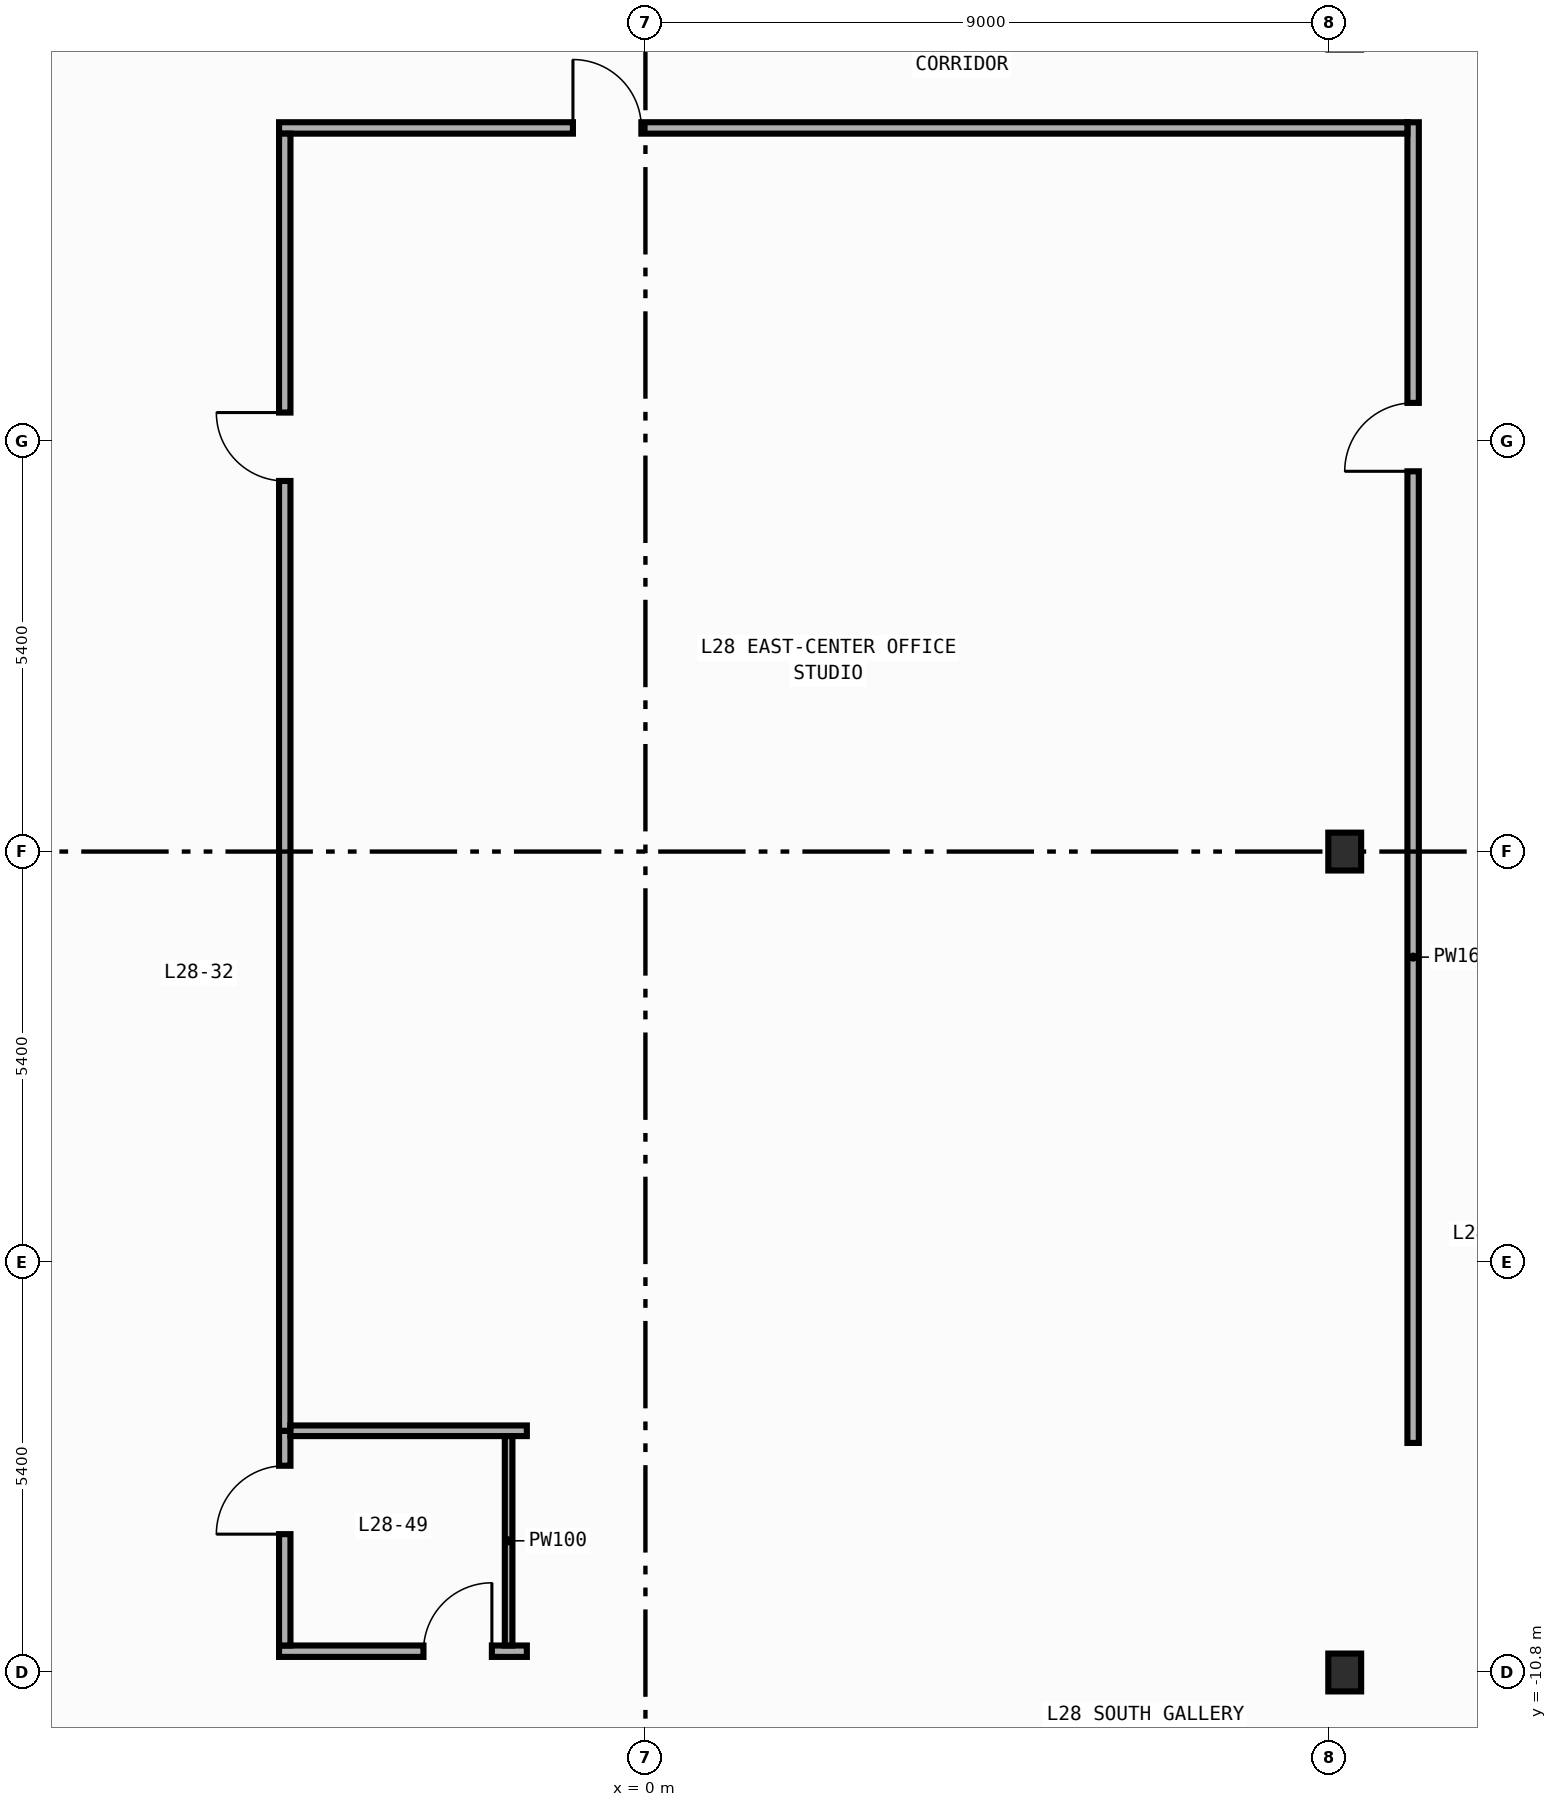
"""IFC4 building model, lengths in metres.
Left out: names, types, materials, properties, quantities, classifications, styles, units other than length and angle.
Written with IfcOpenShell. Run it as: python <this file> out.ifc"""

import sys

from ifc_helpers import new_model, si_unit, direction, frame, frame_2d, origin, origin_2d, place, context, subcontext, project, spatial, rectangle, i_section, extrude, element, fill, save


model = new_model("IFC4")
c1 = context("Model", 3, precision=1e-05, world=origin(), true_north=direction((0.0, 1.0)))
c2 = subcontext(c1, "Body", "Model", "MODEL_VIEW")
j1 = project(units=[si_unit("LENGTHUNIT", "METRE"), si_unit("PLANEANGLEUNIT", "RADIAN")], contexts=[c1])
p1 = place(None, origin())
s1 = spatial("IfcSite", under=j1, at=p1, CompositionType="ELEMENT")
p2 = place(p1, origin())
s2 = spatial("IfcBuilding", under=s1, at=p2, CompositionType="ELEMENT")
p3 = place(p2, frame((0.0, 0.0, 122.6)))
s3 = spatial("IfcBuildingStorey", under=s2, at=p3, CompositionType="ELEMENT", Elevation=122.6)
for number, where, z_axis, x_axis in (
    (1, (9.2, -10.8, 0.0), (0.0, 0.0, 1.0), (1.0, 0.0, 0.0)),
    (2, (9.2, 0.0, 0.0), (0.0, 0.0, 1.0), (1.0, 0.0, 0.0)),
):
    element("IfcColumn", number, at=place(p3, frame(where, z_axis=z_axis, x_axis=x_axis)), inside=s3, PredefinedType="COLUMN", context=c2, shape_type="SweptSolid", body=[
        extrude(i_section(OverallWidth=0.432, OverallDepth=0.498, WebThickness=0.045, FlangeThickness=0.07, FilletRadius=0.022, at=origin_2d()), origin(), (0.0, 0.0, 1.0), 4.2),
    ])
p4 = place(p3, frame((10.1, -7.78, 0.0), z_axis=(0.0, 0.0, 1.0), x_axis=(0.0, 1.0, 0.0)))
e3 = element("IfcWall", 3, at=p4, inside=s3, PredefinedType="PARTITIONING", context=c2, shape_type="SweptSolid", body=[
    extrude(rectangle(XDim=17.375, YDim=0.15, at=frame_2d((8.688, 0.0))), origin(), (0.0, 0.0, 1.0), 3.94),
])
p5 = place(p4, frame((12.783, 0.0, 0.0)))
e4 = element("IfcOpeningElement", 4, at=p5, cuts=e3, PredefinedType="OPENING", context=c2, shape_type="SweptSolid", body=[
    extrude(rectangle(XDim=0.9, YDim=2.15, at=frame_2d((0.45, 1.075))), frame((0.0, 0.085, 0.0), z_axis=(0.0, -1.0, 0.0), x_axis=(1.0, 0.0, 0.0)), (0.0, 0.0, 1.0), 0.17),
])
p6 = place(p3, frame((-4.82, 9.52, 0.0), z_axis=(0.0, 0.0, 1.0), x_axis=(1.0, 0.0, 0.0)))
e5 = element("IfcWall", 5, at=p6, inside=s3, PredefinedType="PARTITIONING", context=c2, shape_type="SweptSolid", body=[
    extrude(rectangle(XDim=14.845, YDim=0.15, at=frame_2d((7.422, 0.0))), origin(), (0.0, 0.0, 1.0), 3.94),
])
p7 = place(p6, frame((3.866, 0.0, 0.0)))
e6 = element("IfcOpeningElement", 6, at=p7, cuts=e5, PredefinedType="OPENING", context=c2, shape_type="SweptSolid", body=[
    extrude(rectangle(XDim=0.9, YDim=2.15, at=frame_2d((0.45, 1.075))), frame((0.0, 0.085, 0.0), z_axis=(0.0, -1.0, 0.0), x_axis=(1.0, 0.0, 0.0)), (0.0, 0.0, 1.0), 0.17),
])
p8 = place(p3, frame((-4.82, -10.52, 0.0), z_axis=(0.0, 0.0, 1.0), x_axis=(1.0, 0.0, 0.0)))
e7 = element("IfcWall", 7, at=p8, inside=s3, PredefinedType="PARTITIONING", context=c2, shape_type="SweptSolid", body=[
    extrude(rectangle(XDim=3.26, YDim=0.15, at=frame_2d((1.63, 0.0))), origin(), (0.0, 0.0, 1.0), 3.24),
])
p9 = place(p8, frame((1.9, 0.0, 0.0)))
e8 = element("IfcOpeningElement", 8, at=p9, cuts=e7, PredefinedType="OPENING", context=c2, shape_type="SweptSolid", body=[
    extrude(rectangle(XDim=0.9, YDim=2.15, at=frame_2d((0.45, 1.075))), frame((0.0, 0.085, 0.0), z_axis=(0.0, -1.0, 0.0), x_axis=(1.0, 0.0, 0.0)), (0.0, 0.0, 1.0), 0.17),
])
p10 = place(p3, frame((-4.745, -10.445, 0.0), z_axis=(0.0, 0.0, 1.0), x_axis=(0.0, 1.0, 0.0)))
e9 = element("IfcWall", 9, at=p10, inside=s3, PredefinedType="PARTITIONING", context=c2, shape_type="SweptSolid", body=[
    extrude(rectangle(XDim=2.825, YDim=0.15, at=frame_2d((1.413, 0.0))), origin(), (0.0, 0.0, 1.0), 3.49),
])
p11 = place(p10, frame((1.465, 0.0, 0.0)))
e10 = element("IfcOpeningElement", 10, at=p11, cuts=e9, PredefinedType="OPENING", context=c2, shape_type="SweptSolid", body=[
    extrude(rectangle(XDim=0.9, YDim=2.15, at=frame_2d((0.45, 1.075))), frame((0.0, 0.085, 0.0), z_axis=(0.0, -1.0, 0.0), x_axis=(1.0, 0.0, 0.0)), (0.0, 0.0, 1.0), 0.17),
])
p12 = place(p3, frame((-4.745, -7.62, 0.0), z_axis=(0.0, 0.0, 1.0), x_axis=(0.0, 1.0, 0.0)))
e11 = element("IfcWall", 11, at=p12, inside=s3, PredefinedType="PARTITIONING", context=c2, shape_type="SweptSolid", body=[
    extrude(rectangle(XDim=17.065, YDim=0.15, at=frame_2d((8.533, 0.0))), origin(), (0.0, 0.0, 1.0), 3.49),
])
p13 = place(p12, frame((12.496, 0.0, 0.0)))
e12 = element("IfcOpeningElement", 12, at=p13, cuts=e11, PredefinedType="OPENING", context=c2, shape_type="SweptSolid", body=[
    extrude(rectangle(XDim=0.9, YDim=2.15, at=frame_2d((0.45, 1.075))), frame((0.0, 0.085, 0.0), z_axis=(0.0, -1.0, 0.0), x_axis=(1.0, 0.0, 0.0)), (0.0, 0.0, 1.0), 0.17),
])
p14 = place(p3, frame((-4.67, -7.62, 0.0), z_axis=(0.0, 0.0, 1.0), x_axis=(1.0, 0.0, 0.0)))
e13 = element("IfcWall", 13, at=p14, inside=s3, PredefinedType="PARTITIONING", context=c2, shape_type="SweptSolid", body=[
    extrude(rectangle(XDim=3.11, YDim=0.14, at=frame_2d((1.555, 0.0))), origin(), (0.0, 0.0, 1.0), 3.94),
])
p15 = place(p3, frame((-1.8, -7.69, 0.0), z_axis=(0.0, 0.0, 1.0), x_axis=(0.0, -1.0, 0.0)))
e14 = element("IfcWall", 14, at=p15, inside=s3, PredefinedType="PARTITIONING", context=c2, shape_type="SweptSolid", body=[
    extrude(rectangle(XDim=2.755, YDim=0.1, at=frame_2d((1.377, 0.0))), origin(), (0.0, 0.0, 1.0), 3.94),
])
p16 = place(p5, origin())
e15 = element("IfcDoor", 15, at=p16, inside=s3, OperationType="SINGLE_SWING_LEFT", PredefinedType="DOOR", context=c2, shape_type="SweptSolid", body=[
    extrude(rectangle(XDim=0.9, YDim=2.15, at=frame_2d((0.45, 1.075))), frame((0.0, 0.025, 0.0), z_axis=(0.0, -1.0, 0.0), x_axis=(1.0, 0.0, 0.0)), (0.0, 0.0, 1.0), 0.05),
])
fill(e4, e15)
p17 = place(p7, origin())
e16 = element("IfcDoor", 16, at=p17, inside=s3, OperationType="SINGLE_SWING_LEFT", PredefinedType="DOOR", context=c2, shape_type="SweptSolid", body=[
    extrude(rectangle(XDim=0.9, YDim=2.15, at=frame_2d((0.45, 1.075))), frame((0.0, 0.025, 0.0), z_axis=(0.0, -1.0, 0.0), x_axis=(1.0, 0.0, 0.0)), (0.0, 0.0, 1.0), 0.05),
])
fill(e6, e16)
p18 = place(p9, origin())
e17 = element("IfcDoor", 17, at=p18, inside=s3, OperationType="SINGLE_SWING_RIGHT", PredefinedType="DOOR", context=c2, shape_type="SweptSolid", body=[
    extrude(rectangle(XDim=0.9, YDim=2.15, at=frame_2d((0.45, 1.075))), frame((0.0, 0.025, 0.0), z_axis=(0.0, -1.0, 0.0), x_axis=(1.0, 0.0, 0.0)), (0.0, 0.0, 1.0), 0.05),
])
fill(e8, e17)
p19 = place(p11, origin())
e18 = element("IfcDoor", 18, at=p19, inside=s3, OperationType="SINGLE_SWING_LEFT", PredefinedType="DOOR", context=c2, shape_type="SweptSolid", body=[
    extrude(rectangle(XDim=0.9, YDim=2.15, at=frame_2d((0.45, 1.075))), frame((0.0, 0.025, 0.0), z_axis=(0.0, -1.0, 0.0), x_axis=(1.0, 0.0, 0.0)), (0.0, 0.0, 1.0), 0.05),
])
fill(e10, e18)
p20 = place(p13, origin())
e19 = element("IfcDoor", 19, at=p20, inside=s3, OperationType="SINGLE_SWING_RIGHT", PredefinedType="DOOR", context=c2, shape_type="SweptSolid", body=[
    extrude(rectangle(XDim=0.9, YDim=2.15, at=frame_2d((0.45, 1.075))), frame((0.0, 0.025, 0.0), z_axis=(0.0, -1.0, 0.0), x_axis=(1.0, 0.0, 0.0)), (0.0, 0.0, 1.0), 0.05),
])
fill(e12, e19)
save(model, sys.argv[1])
